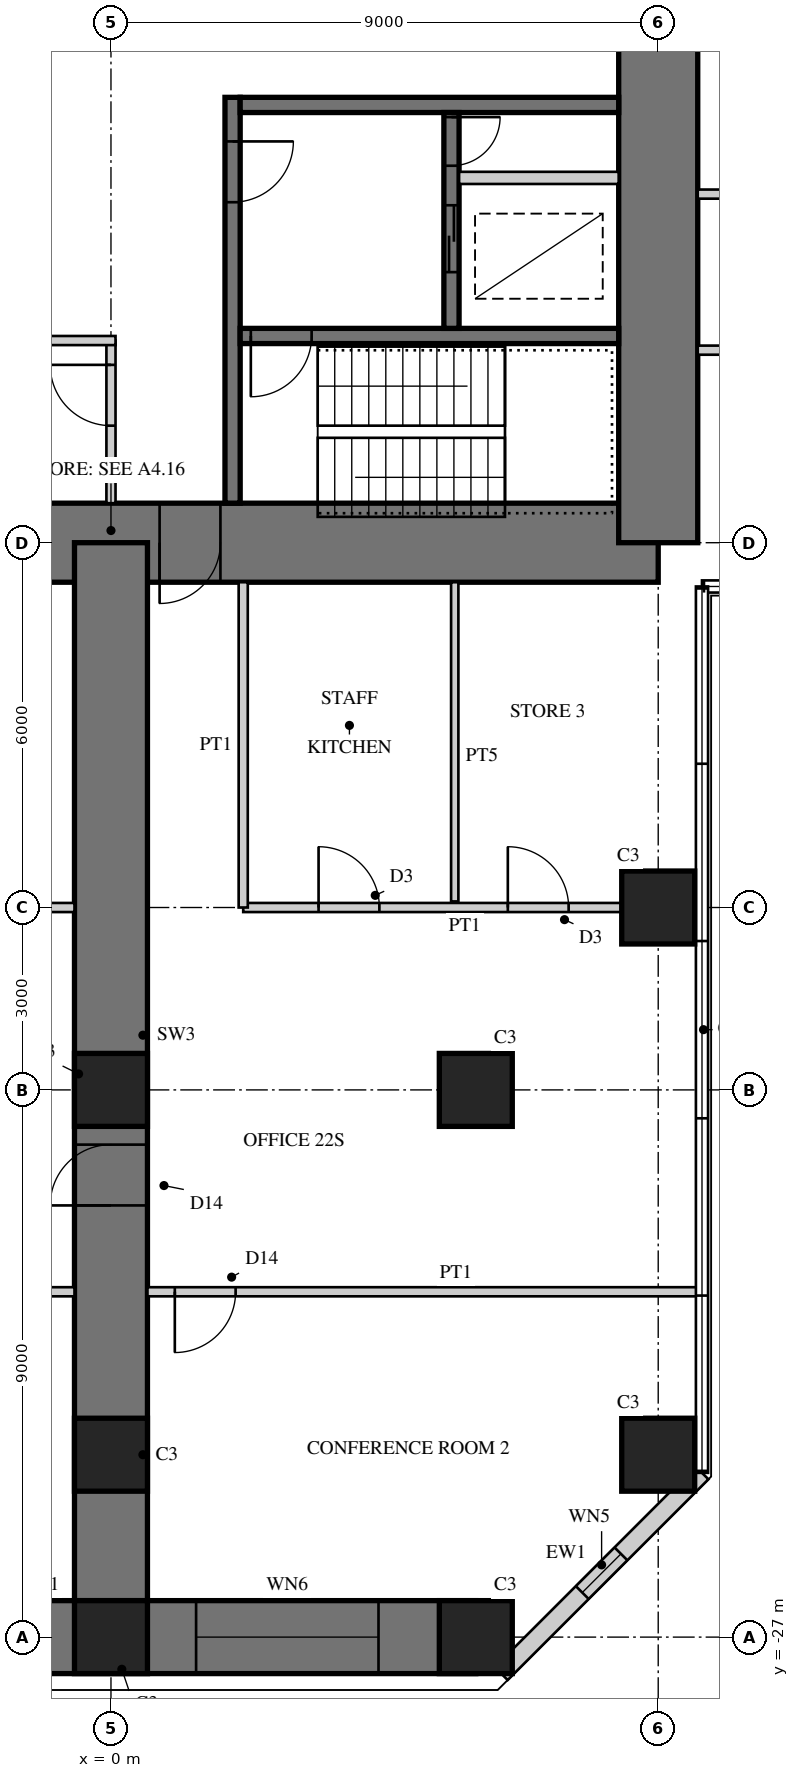
"""IFC4 building model, lengths in metres.
Left out: names, types, materials, properties, quantities, classifications, styles, units other than length and angle.
Written with IfcOpenShell. Run it as: python <this file> out.ifc"""

import sys

from ifc_helpers import new_model, si_unit, direction, frame, frame_2d, origin, origin_2d, place, context, subcontext, project, spatial, rectangle, hollow_rectangle, extrude, element, fill, save


model = new_model("IFC4")
c1 = context("Model", 3, precision=1e-05, world=origin(), true_north=direction((0.0, 1.0)))
c2 = subcontext(c1, "Body", "Model", "MODEL_VIEW")
j1 = project(units=[si_unit("LENGTHUNIT", "METRE"), si_unit("PLANEANGLEUNIT", "RADIAN")], contexts=[c1])
p1 = place(None, origin())
s1 = spatial("IfcSite", under=j1, at=p1, CompositionType="ELEMENT")
p2 = place(p1, origin())
s2 = spatial("IfcBuilding", under=s1, at=p2, CompositionType="ELEMENT")
p3 = place(p2, frame((0.0, 0.0, 91.5)))
s3 = spatial("IfcBuildingStorey", under=s2, at=p3, CompositionType="ELEMENT", Elevation=91.5)
p4 = place(p3, frame((-9.0, -9.0, 0.0), z_axis=(0.0, 0.0, 1.0), x_axis=(1.0, 0.0, 0.0)))
e1 = element("IfcWall", 1, at=p4, inside=s3, PredefinedType="SHEAR", context=c2, shape_type="SweptSolid", body=[
    extrude(rectangle(XDim=18.0, YDim=1.3, at=frame_2d((9.0, 0.0))), origin(), (0.0, 0.0, 1.0), 4.0),
])
p5 = place(p4, frame((9.8, 0.0, 0.0)))
e2 = element("IfcOpeningElement", 2, at=p5, cuts=e1, PredefinedType="OPENING", context=c2, shape_type="SweptSolid", body=[
    extrude(rectangle(XDim=1.0, YDim=2.4, at=frame_2d((0.5, 1.2))), frame((0.0, 0.66, 0.0), z_axis=(0.0, -1.0, 0.0), x_axis=(1.0, 0.0, 0.0)), (0.0, 0.0, 1.0), 1.32),
])
p6 = place(p3, frame((9.0, -9.0, 0.0), z_axis=(0.0, 0.0, 1.0), x_axis=(0.0, 1.0, 0.0)))
e3 = element("IfcWall", 3, at=p6, inside=s3, PredefinedType="SHEAR", context=c2, shape_type="SweptSolid", body=[
    extrude(rectangle(XDim=18.0, YDim=1.3, at=frame_2d((9.0, 0.0))), origin(), (0.0, 0.0, 1.0), 4.0),
])
p7 = place(p6, frame((9.8, 0.0, 0.0)))
e4 = element("IfcOpeningElement", 4, at=p7, cuts=e3, PredefinedType="OPENING", context=c2, shape_type="SweptSolid", body=[
    extrude(rectangle(XDim=1.0, YDim=2.4, at=frame_2d((0.5, 1.2))), frame((0.0, 0.66, 0.0), z_axis=(0.0, -1.0, 0.0), x_axis=(1.0, 0.0, 0.0)), (0.0, 0.0, 1.0), 1.32),
])
p8 = place(p3, frame((2.0, -1.675, 0.0), z_axis=(0.0, 0.0, 1.0), x_axis=(0.0, -1.0, 0.0)))
e5 = element("IfcWall", 5, at=p8, inside=s3, PredefinedType="SHEAR", context=c2, shape_type="SweptSolid", body=[
    extrude(rectangle(XDim=6.675, YDim=0.25, at=frame_2d((3.337, 0.0))), origin(), (0.0, 0.0, 1.0), 4.0),
])
p9 = place(p8, frame((0.725, 0.0, 0.0)))
e6 = element("IfcOpeningElement", 6, at=p9, cuts=e5, PredefinedType="OPENING", context=c2, shape_type="SweptSolid", body=[
    extrude(rectangle(XDim=1.0, YDim=2.1, at=frame_2d((0.5, 1.05))), frame((0.0, 0.135, 0.0), z_axis=(0.0, -1.0, 0.0), x_axis=(1.0, 0.0, 0.0)), (0.0, 0.0, 1.0), 0.27),
])
p10 = place(p3, frame((2.125, -1.8, 0.0), z_axis=(0.0, 0.0, 1.0), x_axis=(1.0, 0.0, 0.0)))
e7 = element("IfcWall", 7, at=p10, inside=s3, PredefinedType="SHEAR", context=c2, shape_type="SweptSolid", body=[
    extrude(rectangle(XDim=6.225, YDim=0.25, at=frame_2d((3.113, 0.0))), origin(), (0.0, 0.0, 1.0), 4.0),
])
p11 = place(p3, frame((2.125, -5.6, 0.0), z_axis=(0.0, 0.0, 1.0), x_axis=(1.0, 0.0, 0.0)))
e8 = element("IfcWall", 8, at=p11, inside=s3, PredefinedType="SHEAR", context=c2, shape_type="SweptSolid", body=[
    extrude(rectangle(XDim=6.225, YDim=0.25, at=frame_2d((3.113, 0.0))), origin(), (0.0, 0.0, 1.0), 4.0),
])
p12 = place(p11, frame((0.175, 0.0, 0.0)))
e9 = element("IfcOpeningElement", 9, at=p12, cuts=e8, PredefinedType="OPENING", context=c2, shape_type="SweptSolid", body=[
    extrude(rectangle(XDim=1.0, YDim=2.1, at=frame_2d((0.5, 1.05))), frame((0.0, 0.135, 0.0), z_axis=(0.0, -1.0, 0.0), x_axis=(1.0, 0.0, 0.0)), (0.0, 0.0, 1.0), 0.27),
])
p13 = place(p3, frame((5.6, -1.925, 0.0), z_axis=(0.0, 0.0, 1.0), x_axis=(0.0, -1.0, 0.0)))
e10 = element("IfcWall", 10, at=p13, inside=s3, PredefinedType="SHEAR", context=c2, shape_type="SweptSolid", body=[
    extrude(rectangle(XDim=3.55, YDim=0.25, at=frame_2d((1.775, 0.0))), origin(), (0.0, 0.0, 1.0), 4.0),
])
p14 = place(p13, frame((1.525, 0.0, 0.0)))
e11 = element("IfcOpeningElement", 11, at=p14, cuts=e10, PredefinedType="OPENING", context=c2, shape_type="SweptSolid", body=[
    extrude(rectangle(XDim=1.1, YDim=2.2, at=frame_2d((0.55, 1.1))), frame((0.0, 0.135, 0.0), z_axis=(0.0, -1.0, 0.0), x_axis=(1.0, 0.0, 0.0)), (0.0, 0.0, 1.0), 0.27),
])
p15 = place(p13, frame((0.075, 0.0, 0.0)))
e12 = element("IfcOpeningElement", 12, at=p15, cuts=e10, PredefinedType="OPENING", context=c2, shape_type="SweptSolid", body=[
    extrude(rectangle(XDim=0.8, YDim=2.1, at=frame_2d((0.4, 1.05))), frame((0.0, 0.135, 0.0), z_axis=(0.0, -1.0, 0.0), x_axis=(1.0, 0.0, 0.0)), (0.0, 0.0, 1.0), 0.27),
])
p16 = place(p3, frame((5.725, -3.0, 0.0), z_axis=(0.0, 0.0, 1.0), x_axis=(1.0, 0.0, 0.0)))
e13 = element("IfcWall", 13, at=p16, inside=s3, PredefinedType="PARTITIONING", context=c2, shape_type="SweptSolid", body=[
    extrude(rectangle(XDim=2.625, YDim=0.2, at=frame_2d((1.312, 0.0))), origin(), (0.0, 0.0, 1.0), 4.0),
])
p17 = place(p3, frame((0.0, -9.0, 0.0), z_axis=(0.0, 0.0, 1.0), x_axis=(0.0, -1.0, 0.0)))
e14 = element("IfcWall", 14, at=p17, inside=s3, PredefinedType="SHEAR", context=c2, shape_type="SweptSolid", body=[
    extrude(rectangle(XDim=18.0, YDim=1.2, at=frame_2d((9.0, 0.0))), origin(), (0.0, 0.0, 1.0), 4.0),
])
p18 = place(p17, frame((9.9, 0.0, 0.0)))
e15 = element("IfcOpeningElement", 15, at=p18, cuts=e14, PredefinedType="OPENING", context=c2, shape_type="SweptSolid", body=[
    extrude(rectangle(XDim=1.0, YDim=2.2, at=frame_2d((0.5, 1.1))), frame((0.0, 0.61, 0.0), z_axis=(0.0, -1.0, 0.0), x_axis=(1.0, 0.0, 0.0)), (0.0, 0.0, 1.0), 1.22),
])
p19 = place(p3, frame((-6.0, -27.0, 0.0), z_axis=(0.0, 0.0, 1.0), x_axis=(1.0, 0.0, 0.0)))
e16 = element("IfcWall", 16, at=p19, inside=s3, PredefinedType="SHEAR", context=c2, shape_type="SweptSolid", body=[
    extrude(rectangle(XDim=12.0, YDim=1.2, at=frame_2d((6.0, 0.0))), origin(), (0.0, 0.0, 1.0), 4.0),
])
p20 = place(p19, frame((1.6, 0.0, 0.6)))
e17 = element("IfcOpeningElement", 17, at=p20, cuts=e16, PredefinedType="OPENING", context=c2, shape_type="SweptSolid", body=[
    extrude(rectangle(XDim=3.0, YDim=2.4, at=frame_2d((1.5, 1.2))), frame((0.0, 0.61, 0.0), z_axis=(0.0, -1.0, 0.0), x_axis=(1.0, 0.0, 0.0)), (0.0, 0.0, 1.0), 1.22),
])
p21 = place(p19, frame((7.4, 0.0, 0.6)))
e18 = element("IfcOpeningElement", 18, at=p21, cuts=e16, PredefinedType="OPENING", context=c2, shape_type="SweptSolid", body=[
    extrude(rectangle(XDim=3.0, YDim=2.4, at=frame_2d((1.5, 1.2))), frame((0.0, 0.61, 0.0), z_axis=(0.0, -1.0, 0.0), x_axis=(1.0, 0.0, 0.0)), (0.0, 0.0, 1.0), 1.22),
])
for number, where, z_axis, x_axis in (
    (19, (9.0, -15.0, 0.0), (0.0, 0.0, 1.0), (1.0, 0.0, 0.0)),
    (20, (9.0, -24.0, 0.0), (0.0, 0.0, 1.0), (1.0, 0.0, 0.0)),
    (21, (0.0, -27.0, 0.0), (0.0, 0.0, 1.0), (1.0, 0.0, 0.0)),
    (22, (6.0, -27.0, 0.0), (0.0, 0.0, 1.0), (1.0, 0.0, 0.0)),
    (23, (0.0, -18.0, 0.0), (0.0, 0.0, 1.0), (1.0, 0.0, 0.0)),
    (24, (6.0, -18.0, 0.0), (0.0, 0.0, 1.0), (1.0, 0.0, 0.0)),
    (25, (0.0, -24.0, 0.0), (0.0, 0.0, 1.0), (1.0, 0.0, 0.0)),
):
    element("IfcColumn", number, at=place(p3, frame(where, z_axis=z_axis, x_axis=x_axis)), inside=s3, PredefinedType="COLUMN", context=c2, shape_type="SweptSolid", body=[
        extrude(rectangle(XDim=1.2, YDim=1.2, at=origin_2d()), origin(), (0.0, 0.0, 1.0), 4.0),
    ])
p22 = place(p3, frame((6.418, -27.6, 0.0), z_axis=(0.0, 0.0, 1.0), x_axis=(0.707106781187, 0.707106781187, 0.0)))
e26 = element("IfcWall", 26, at=p22, inside=s3, PredefinedType="SOLIDWALL", context=c2, shape_type="SweptSolid", body=[
    extrude(rectangle(XDim=4.669, YDim=0.3, at=frame_2d((2.335, 0.0))), origin(), (0.0, 0.0, 1.0), 3.75),
])
p23 = place(p22, frame((1.885, 0.0, 0.3)))
e27 = element("IfcOpeningElement", 27, at=p23, cuts=e26, PredefinedType="OPENING", context=c2, shape_type="SweptSolid", body=[
    extrude(rectangle(XDim=0.9, YDim=2.4, at=frame_2d((0.45, 1.2))), frame((0.0, 0.16, 0.0), z_axis=(0.0, -1.0, 0.0), x_axis=(1.0, 0.0, 0.0)), (0.0, 0.0, 1.0), 0.32),
])
p24 = place(p3, frame((0.0, -5.675, 0.0), z_axis=(0.0, 0.0, 1.0), x_axis=(0.0, -1.0, 0.0)))
e28 = element("IfcWall", 28, at=p24, inside=s3, PredefinedType="PARTITIONING", context=c2, shape_type="SweptSolid", body=[
    extrude(rectangle(XDim=2.675, YDim=0.15, at=frame_2d((1.337, 0.0))), origin(), (0.0, 0.0, 1.0), 3.75),
])
p25 = place(p24, frame((0.4, 0.0, 0.0)))
e29 = element("IfcOpeningElement", 29, at=p25, cuts=e28, PredefinedType="OPENING", context=c2, shape_type="SweptSolid", body=[
    extrude(rectangle(XDim=1.0, YDim=2.1, at=frame_2d((0.5, 1.05))), frame((0.0, 0.085, 0.0), z_axis=(0.0, -1.0, 0.0), x_axis=(1.0, 0.0, 0.0)), (0.0, 0.0, 1.0), 0.17),
])
p26 = place(p3, frame((-1.675, -5.675, 0.0), z_axis=(0.0, 0.0, 1.0), x_axis=(1.0, 0.0, 0.0)))
e30 = element("IfcWall", 30, at=p26, inside=s3, PredefinedType="PARTITIONING", context=c2, shape_type="SweptSolid", body=[
    extrude(rectangle(XDim=1.75, YDim=0.15, at=frame_2d((0.875, 0.0))), origin(), (0.0, 0.0, 1.0), 3.75),
])
p27 = place(p3, frame((9.65, -3.267, 0.0), z_axis=(0.0, 0.0, 1.0), x_axis=(1.0, 0.0, 0.0)))
e31 = element("IfcWall", 31, at=p27, inside=s3, PredefinedType="PARTITIONING", context=c2, shape_type="SweptSolid", body=[
    extrude(rectangle(XDim=5.25, YDim=0.15, at=frame_2d((2.625, 0.0))), origin(), (0.0, 0.0, 1.0), 3.75),
])
p28 = place(p3, frame((9.65, -5.833, 0.0), z_axis=(0.0, 0.0, 1.0), x_axis=(1.0, 0.0, 0.0)))
e32 = element("IfcWall", 32, at=p28, inside=s3, PredefinedType="PARTITIONING", context=c2, shape_type="SweptSolid", body=[
    extrude(rectangle(XDim=5.25, YDim=0.15, at=frame_2d((2.625, 0.0))), origin(), (0.0, 0.0, 1.0), 2.8),
])
p29 = place(p3, frame((2.175, -15.0, 0.0), z_axis=(0.0, 0.0, 1.0), x_axis=(1.0, 0.0, 0.0)))
e33 = element("IfcWall", 33, at=p29, inside=s3, PredefinedType="PARTITIONING", context=c2, shape_type="SweptSolid", body=[
    extrude(rectangle(XDim=6.225, YDim=0.15, at=frame_2d((3.112, 0.0))), origin(), (0.0, 0.0, 1.0), 2.7),
])
p30 = place(p29, frame((1.239, 0.0, 0.0)))
e34 = element("IfcOpeningElement", 34, at=p30, cuts=e33, PredefinedType="OPENING", context=c2, shape_type="SweptSolid", body=[
    extrude(rectangle(XDim=1.0, YDim=2.1, at=frame_2d((0.5, 1.05))), frame((0.0, 0.085, 0.0), z_axis=(0.0, -1.0, 0.0), x_axis=(1.0, 0.0, 0.0)), (0.0, 0.0, 1.0), 0.17),
])
p31 = place(p29, frame((4.352, 0.0, 0.0)))
e35 = element("IfcOpeningElement", 35, at=p31, cuts=e33, PredefinedType="OPENING", context=c2, shape_type="SweptSolid", body=[
    extrude(rectangle(XDim=1.0, YDim=2.1, at=frame_2d((0.5, 1.05))), frame((0.0, 0.085, 0.0), z_axis=(0.0, -1.0, 0.0), x_axis=(1.0, 0.0, 0.0)), (0.0, 0.0, 1.0), 0.17),
])
p32 = place(p3, frame((2.175, -9.65, 0.0), z_axis=(0.0, 0.0, 1.0), x_axis=(0.0, -1.0, 0.0)))
e36 = element("IfcWall", 36, at=p32, inside=s3, PredefinedType="PARTITIONING", context=c2, shape_type="SweptSolid", body=[
    extrude(rectangle(XDim=5.35, YDim=0.15, at=frame_2d((2.675, 0.0))), origin(), (0.0, 0.0, 1.0), 3.75),
])
p33 = place(p3, frame((5.654, -9.65, 0.0), z_axis=(0.0, 0.0, 1.0), x_axis=(0.0, -1.0, 0.0)))
e37 = element("IfcWall", 37, at=p33, inside=s3, PredefinedType="PLUMBINGWALL", context=c2, shape_type="SweptSolid", body=[
    extrude(rectangle(XDim=5.25, YDim=0.12, at=frame_2d((2.625, 0.0))), origin(), (0.0, 0.0, 1.0), 3.75),
])
p34 = place(p3, frame((-8.4, -15.0, 0.0), z_axis=(0.0, 0.0, 1.0), x_axis=(1.0, 0.0, 0.0)))
e38 = element("IfcWall", 38, at=p34, inside=s3, PredefinedType="PARTITIONING", context=c2, shape_type="SweptSolid", body=[
    extrude(rectangle(XDim=7.8, YDim=0.15, at=frame_2d((3.9, 0.0))), origin(), (0.0, 0.0, 1.0), 2.7),
])
p35 = place(p34, frame((3.4, 0.0, 0.0)))
e39 = element("IfcOpeningElement", 39, at=p35, cuts=e38, PredefinedType="OPENING", context=c2, shape_type="SweptSolid", body=[
    extrude(rectangle(XDim=1.0, YDim=2.1, at=frame_2d((0.5, 1.05))), frame((0.0, 0.085, 0.0), z_axis=(0.0, -1.0, 0.0), x_axis=(1.0, 0.0, 0.0)), (0.0, 0.0, 1.0), 0.17),
])
p36 = place(p3, frame((0.6, -21.32, 0.0), z_axis=(0.0, 0.0, 1.0), x_axis=(1.0, 0.0, 0.0)))
e40 = element("IfcWall", 40, at=p36, inside=s3, PredefinedType="PARTITIONING", context=c2, shape_type="SweptSolid", body=[
    extrude(rectangle(XDim=9.08, YDim=0.15, at=frame_2d((4.54, 0.0))), origin(), (0.0, 0.0, 1.0), 3.75),
])
p37 = place(p36, frame((0.45, 0.0, 0.0)))
e41 = element("IfcOpeningElement", 41, at=p37, cuts=e40, PredefinedType="OPENING", context=c2, shape_type="SweptSolid", body=[
    extrude(rectangle(XDim=1.0, YDim=2.2, at=frame_2d((0.5, 1.1))), frame((0.0, 0.085, 0.0), z_axis=(0.0, -1.0, 0.0), x_axis=(1.0, 0.0, 0.0)), (0.0, 0.0, 1.0), 0.17),
])
p38 = place(p3, frame((-9.68, -21.32, 0.0), z_axis=(0.0, 0.0, 1.0), x_axis=(1.0, 0.0, 0.0)))
e42 = element("IfcWall", 42, at=p38, inside=s3, PredefinedType="PARTITIONING", context=c2, shape_type="SweptSolid", body=[
    extrude(rectangle(XDim=9.08, YDim=0.15, at=frame_2d((4.54, 0.0))), origin(), (0.0, 0.0, 1.0), 3.75),
])
p39 = place(p38, frame((7.63, 0.0, 0.0)))
e43 = element("IfcOpeningElement", 43, at=p39, cuts=e42, PredefinedType="OPENING", context=c2, shape_type="SweptSolid", body=[
    extrude(rectangle(XDim=1.0, YDim=2.2, at=frame_2d((0.5, 1.1))), frame((0.0, 0.085, 0.0), z_axis=(0.0, -1.0, 0.0), x_axis=(1.0, 0.0, 0.0)), (0.0, 0.0, 1.0), 0.17),
])
p40 = place(p21, origin())
e44 = element("IfcWindow", 44, at=p40, inside=s3, PartitioningType="SINGLE_PANEL", PredefinedType="WINDOW", context=c2, shape_type="SweptSolid", body=[
    extrude(hollow_rectangle(XDim=3.0, YDim=2.4, WallThickness=0.06, at=frame_2d((1.5, 1.2))), frame((0.0, 0.03, 0.0), z_axis=(0.0, -1.0, 0.0), x_axis=(1.0, 0.0, 0.0)), (0.0, 0.0, 1.0), 0.06),
    extrude(rectangle(XDim=2.879, YDim=2.279, at=frame_2d((1.5, 1.2))), frame((0.0, 0.03, 0.0), z_axis=(0.0, -1.0, 0.0), x_axis=(1.0, 0.0, 0.0)), (0.0, 0.0, 1.0), 0.06),
])
fill(e18, e44)
p41 = place(p23, origin())
e45 = element("IfcWindow", 45, at=p41, inside=s3, PartitioningType="SINGLE_PANEL", PredefinedType="WINDOW", context=c2, shape_type="SweptSolid", body=[
    extrude(hollow_rectangle(XDim=0.9, YDim=2.4, WallThickness=0.06, at=frame_2d((0.45, 1.2))), frame((0.0, 0.03, 0.0), z_axis=(0.0, -1.0, 0.0), x_axis=(1.0, 0.0, 0.0)), (0.0, 0.0, 1.0), 0.06),
    extrude(rectangle(XDim=0.779, YDim=2.279, at=frame_2d((0.45, 1.2))), frame((0.0, 0.03, 0.0), z_axis=(0.0, -1.0, 0.0), x_axis=(1.0, 0.0, 0.0)), (0.0, 0.0, 1.0), 0.06),
])
fill(e27, e45)
p42 = place(p25, frame((1.0, 0.0, 0.0), z_axis=(0.0, 0.0, 1.0), x_axis=(-1.0, 0.0, 0.0)))
e46 = element("IfcDoor", 46, at=p42, inside=s3, OperationType="SINGLE_SWING_RIGHT", PredefinedType="DOOR", context=c2, shape_type="SweptSolid", body=[
    extrude(rectangle(XDim=1.0, YDim=2.1, at=frame_2d((0.5, 1.05))), frame((0.0, 0.025, 0.0), z_axis=(0.0, -1.0, 0.0), x_axis=(1.0, 0.0, 0.0)), (0.0, 0.0, 1.0), 0.05),
])
fill(e29, e46)
p43 = place(p30, origin())
e47 = element("IfcDoor", 47, at=p43, inside=s3, OperationType="SINGLE_SWING_LEFT", PredefinedType="DOOR", context=c2, shape_type="SweptSolid", body=[
    extrude(rectangle(XDim=1.0, YDim=2.1, at=frame_2d((0.5, 1.05))), frame((0.0, 0.025, 0.0), z_axis=(0.0, -1.0, 0.0), x_axis=(1.0, 0.0, 0.0)), (0.0, 0.0, 1.0), 0.05),
])
fill(e34, e47)
p44 = place(p31, origin())
e48 = element("IfcDoor", 48, at=p44, inside=s3, OperationType="SINGLE_SWING_LEFT", PredefinedType="DOOR", context=c2, shape_type="SweptSolid", body=[
    extrude(rectangle(XDim=1.0, YDim=2.1, at=frame_2d((0.5, 1.05))), frame((0.0, 0.025, 0.0), z_axis=(0.0, -1.0, 0.0), x_axis=(1.0, 0.0, 0.0)), (0.0, 0.0, 1.0), 0.05),
])
fill(e35, e48)
p45 = place(p37, frame((1.0, 0.0, 0.0), z_axis=(0.0, 0.0, 1.0), x_axis=(-1.0, 0.0, 0.0)))
e49 = element("IfcDoor", 49, at=p45, inside=s3, OperationType="SINGLE_SWING_RIGHT", PredefinedType="DOOR", context=c2, shape_type="SweptSolid", body=[
    extrude(rectangle(XDim=1.0, YDim=2.2, at=frame_2d((0.5, 1.1))), frame((0.0, 0.025, 0.0), z_axis=(0.0, -1.0, 0.0), x_axis=(1.0, 0.0, 0.0)), (0.0, 0.0, 1.0), 0.05),
])
fill(e41, e49)
p46 = place(p18, frame((1.0, 0.0, 0.0), z_axis=(0.0, 0.0, 1.0), x_axis=(-1.0, 0.0, 0.0)))
e50 = element("IfcDoor", 50, at=p46, inside=s3, OperationType="SINGLE_SWING_LEFT", PredefinedType="DOOR", context=c2, shape_type="SweptSolid", body=[
    extrude(rectangle(XDim=1.0, YDim=2.2, at=frame_2d((0.5, 1.1))), frame((0.0, 0.025, 0.0), z_axis=(0.0, -1.0, 0.0), x_axis=(1.0, 0.0, 0.0)), (0.0, 0.0, 1.0), 0.05),
])
fill(e15, e50)
p47 = place(p5, frame((1.0, 0.0, 0.0), z_axis=(0.0, 0.0, 1.0), x_axis=(-1.0, 0.0, 0.0)))
e51 = element("IfcDoor", 51, at=p47, inside=s3, OperationType="SINGLE_SWING_RIGHT", PredefinedType="DOOR", context=c2, shape_type="SweptSolid", body=[
    extrude(rectangle(XDim=1.0, YDim=2.4, at=frame_2d((0.5, 1.2))), frame((0.0, -0.005, 0.0), z_axis=(0.0, -1.0, 0.0), x_axis=(1.0, 0.0, 0.0)), (0.0, 0.0, 1.0), 0.05),
])
fill(e2, e51)
p48 = place(p9, origin())
e52 = element("IfcDoor", 52, at=p48, inside=s3, OperationType="SINGLE_SWING_LEFT", PredefinedType="DOOR", context=c2, shape_type="SweptSolid", body=[
    extrude(rectangle(XDim=1.0, YDim=2.1, at=frame_2d((0.5, 1.05))), frame((0.0, 0.025, 0.0), z_axis=(0.0, -1.0, 0.0), x_axis=(1.0, 0.0, 0.0)), (0.0, 0.0, 1.0), 0.05),
])
fill(e6, e52)
p49 = place(p12, frame((1.0, 0.0, 0.0), z_axis=(0.0, 0.0, 1.0), x_axis=(-1.0, 0.0, 0.0)))
e53 = element("IfcDoor", 53, at=p49, inside=s3, OperationType="SINGLE_SWING_RIGHT", PredefinedType="DOOR", context=c2, shape_type="SweptSolid", body=[
    extrude(rectangle(XDim=1.0, YDim=2.1, at=frame_2d((0.5, 1.05))), frame((0.0, 0.025, 0.0), z_axis=(0.0, -1.0, 0.0), x_axis=(1.0, 0.0, 0.0)), (0.0, 0.0, 1.0), 0.05),
])
fill(e9, e53)
p50 = place(p14, origin())
e54 = element("IfcDoor", 54, at=p50, inside=s3, OperationType="DOUBLE_DOOR_SLIDING", PredefinedType="DOOR", context=c2, shape_type="SweptSolid", body=[
    extrude(rectangle(XDim=1.1, YDim=2.2, at=frame_2d((0.55, 1.1))), frame((0.0, 0.025, 0.0), z_axis=(0.0, -1.0, 0.0), x_axis=(1.0, 0.0, 0.0)), (0.0, 0.0, 1.0), 0.05),
])
fill(e11, e54)
p51 = place(p15, origin())
e55 = element("IfcDoor", 55, at=p51, inside=s3, OperationType="SINGLE_SWING_LEFT", PredefinedType="DOOR", context=c2, shape_type="SweptSolid", body=[
    extrude(rectangle(XDim=0.8, YDim=2.1, at=frame_2d((0.4, 1.05))), frame((0.0, 0.025, 0.0), z_axis=(0.0, -1.0, 0.0), x_axis=(1.0, 0.0, 0.0)), (0.0, 0.0, 1.0), 0.05),
])
fill(e12, e55)
save(model, sys.argv[1])
